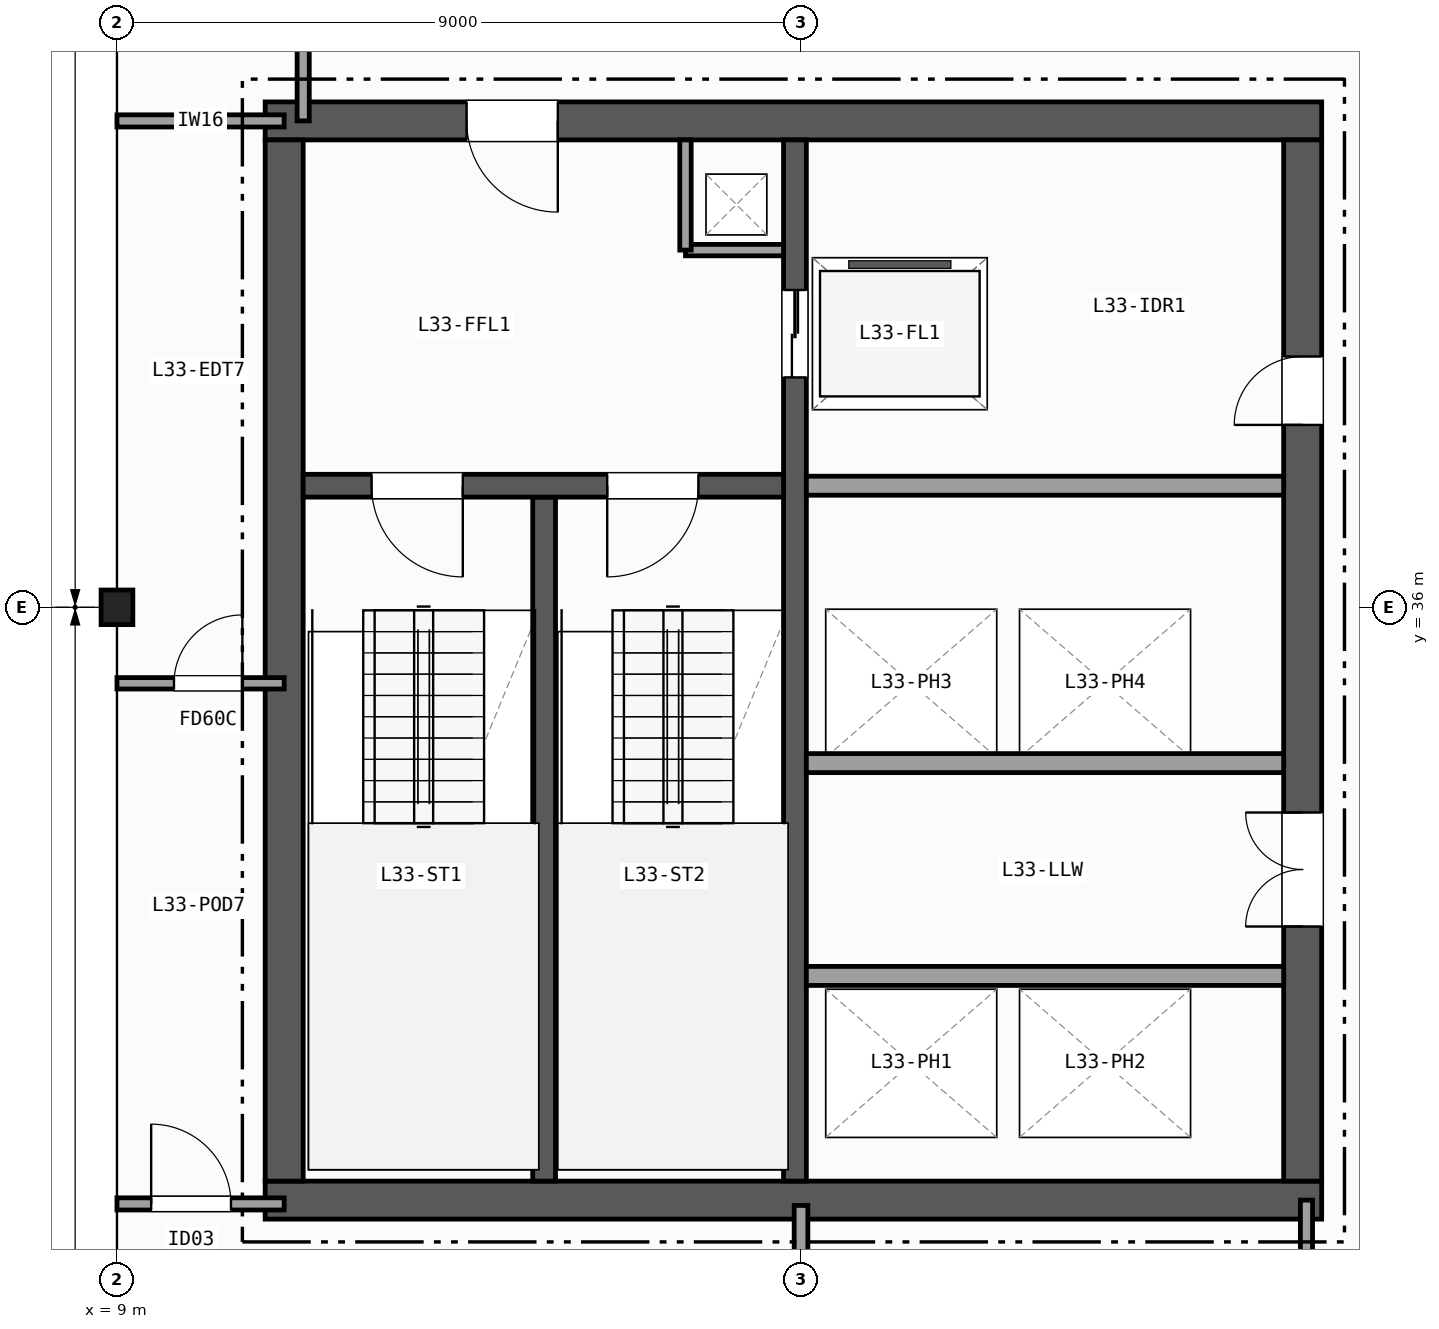
"""IFC4 building model, lengths in metres.
Left out: names, types, materials, properties, quantities, classifications, styles, units other than length and angle.
Written with IfcOpenShell. Run it as: python <this file> out.ifc"""

import sys

from ifc_helpers import new_model, si_unit, direction, frame, frame_2d, origin, origin_2d, place, context, subcontext, project, spatial, rectangle, i_section, extrude, element, fill, save


model = new_model("IFC4")
c1 = context("Model", 3, precision=1e-05, world=origin(), true_north=direction((0.0, 1.0)))
c2 = subcontext(c1, "Body", "Model", "MODEL_VIEW")
j1 = project(units=[si_unit("LENGTHUNIT", "METRE"), si_unit("PLANEANGLEUNIT", "RADIAN")], contexts=[c1])
p1 = place(None, origin())
s1 = spatial("IfcSite", under=j1, at=p1, CompositionType="ELEMENT")
p2 = place(p1, origin())
s2 = spatial("IfcBuilding", under=s1, at=p2, CompositionType="ELEMENT")
p3 = place(p2, frame((0.0, 0.0, 135.9)))
s3 = spatial("IfcBuildingStorey", under=s2, at=p3, CompositionType="ELEMENT", Elevation=135.9)
p4 = place(p3, frame((9.0, 36.0, 0.0), z_axis=(0.0, 0.0, 1.0), x_axis=(1.0, 0.0, 0.0)))
e1 = element("IfcColumn", 1, at=p4, inside=s3, PredefinedType="COLUMN", context=c2, shape_type="SweptSolid", body=[
    extrude(i_section(OverallWidth=0.418, OverallDepth=0.455, WebThickness=0.042, FlangeThickness=0.068, FilletRadius=0.015, at=origin_2d()), origin(), (0.0, 0.0, 1.0), 3.7),
])
p5 = place(p3, frame((10.95, 28.2, 0.0), z_axis=(0.0, 0.0, 1.0), x_axis=(1.0, 0.0, 0.0)))
e2 = element("IfcWall", 2, at=p5, inside=s3, PredefinedType="SHEAR", context=c2, shape_type="SweptSolid", body=[
    extrude(rectangle(XDim=13.9, YDim=0.5, at=frame_2d((6.95, 0.0))), origin(), (0.0, 0.0, 1.0), 3.42),
])
p6 = place(p3, frame((24.85, 42.4, 0.0), z_axis=(0.0, 0.0, 1.0), x_axis=(-1.0, 0.0, 0.0)))
e3 = element("IfcWall", 3, at=p6, inside=s3, PredefinedType="SHEAR", context=c2, shape_type="SweptSolid", body=[
    extrude(rectangle(XDim=13.9, YDim=0.5, at=frame_2d((6.95, 0.0))), origin(), (0.0, 0.0, 1.0), 3.42),
])
p7 = place(p6, frame((10.05, 0.0, 0.0)))
e4 = element("IfcOpeningElement", 4, at=p7, cuts=e3, PredefinedType="OPENING", context=c2, shape_type="SweptSolid", body=[
    extrude(rectangle(XDim=1.2, YDim=2.15, at=frame_2d((0.6, 1.075))), frame((0.0, 0.26, 0.0), z_axis=(0.0, -1.0, 0.0), x_axis=(1.0, 0.0, 0.0)), (0.0, 0.0, 1.0), 0.52),
])
p8 = place(p3, frame((11.2, 42.15, 0.0), z_axis=(0.0, 0.0, 1.0), x_axis=(0.0, -1.0, 0.0)))
e5 = element("IfcWall", 5, at=p8, inside=s3, PredefinedType="SHEAR", context=c2, shape_type="SweptSolid", body=[
    extrude(rectangle(XDim=13.7, YDim=0.5, at=frame_2d((6.85, 0.0))), origin(), (0.0, 0.0, 1.0), 3.42),
])
p9 = place(p3, frame((24.6, 28.45, 0.0), z_axis=(0.0, 0.0, 1.0), x_axis=(0.0, 1.0, 0.0)))
e6 = element("IfcWall", 6, at=p9, inside=s3, PredefinedType="SHEAR", context=c2, shape_type="SweptSolid", body=[
    extrude(rectangle(XDim=13.7, YDim=0.5, at=frame_2d((6.85, 0.0))), origin(), (0.0, 0.0, 1.0), 3.42),
])
p10 = place(p9, frame((3.35, 0.0, 0.0)))
e7 = element("IfcOpeningElement", 7, at=p10, cuts=e6, PredefinedType="OPENING", context=c2, shape_type="SweptSolid", body=[
    extrude(rectangle(XDim=1.5, YDim=2.2, at=frame_2d((0.75, 1.1))), frame((0.0, 0.26, 0.0), z_axis=(0.0, -1.0, 0.0), x_axis=(1.0, 0.0, 0.0)), (0.0, 0.0, 1.0), 0.52),
])
p11 = place(p9, frame((9.95, 0.0, 0.0)))
e8 = element("IfcOpeningElement", 8, at=p11, cuts=e6, PredefinedType="OPENING", context=c2, shape_type="SweptSolid", body=[
    extrude(rectangle(XDim=0.9, YDim=2.1, at=frame_2d((0.45, 1.05))), frame((0.0, 0.26, 0.0), z_axis=(0.0, -1.0, 0.0), x_axis=(1.0, 0.0, 0.0)), (0.0, 0.0, 1.0), 0.52),
])
p12 = place(p3, frame((14.62, 28.45, 0.0), z_axis=(0.0, 0.0, 1.0), x_axis=(0.0, 1.0, 0.0)))
e9 = element("IfcWall", 9, at=p12, inside=s3, PredefinedType="SHEAR", context=c2, shape_type="SweptSolid", body=[
    extrude(rectangle(XDim=9.0, YDim=0.3, at=frame_2d((4.5, 0.0))), origin(), (0.0, 0.0, 1.0), 3.42),
])
p13 = place(p3, frame((17.92, 42.15, 0.0), z_axis=(0.0, 0.0, 1.0), x_axis=(0.0, -1.0, 0.0)))
e10 = element("IfcWall", 10, at=p13, inside=s3, PredefinedType="SHEAR", context=c2, shape_type="SweptSolid", body=[
    extrude(rectangle(XDim=13.7, YDim=0.3, at=frame_2d((6.85, 0.0))), origin(), (0.0, 0.0, 1.0), 3.42),
])
p14 = place(p13, frame((1.975, 0.0, 0.0)))
e11 = element("IfcOpeningElement", 11, at=p14, cuts=e10, PredefinedType="OPENING", context=c2, shape_type="SweptSolid", body=[
    extrude(rectangle(XDim=1.15, YDim=2.15, at=frame_2d((0.575, 1.075))), frame((0.0, 0.16, 0.0), z_axis=(0.0, -1.0, 0.0), x_axis=(1.0, 0.0, 0.0)), (0.0, 0.0, 1.0), 0.32),
])
p15 = place(p3, frame((17.77, 37.6, 0.0), z_axis=(0.0, 0.0, 1.0), x_axis=(-1.0, 0.0, 0.0)))
e12 = element("IfcWall", 12, at=p15, inside=s3, PredefinedType="SHEAR", context=c2, shape_type="SweptSolid", body=[
    extrude(rectangle(XDim=6.32, YDim=0.3, at=frame_2d((3.16, 0.0))), origin(), (0.0, 0.0, 1.0), 3.42),
])
p16 = place(p15, frame((4.22, 0.0, 0.0)))
e13 = element("IfcOpeningElement", 13, at=p16, cuts=e12, PredefinedType="OPENING", context=c2, shape_type="SweptSolid", body=[
    extrude(rectangle(XDim=1.2, YDim=2.15, at=frame_2d((0.6, 1.075))), frame((0.0, 0.16, 0.0), z_axis=(0.0, -1.0, 0.0), x_axis=(1.0, 0.0, 0.0)), (0.0, 0.0, 1.0), 0.32),
])
p17 = place(p15, frame((1.12, 0.0, 0.0)))
e14 = element("IfcOpeningElement", 14, at=p17, cuts=e12, PredefinedType="OPENING", context=c2, shape_type="SweptSolid", body=[
    extrude(rectangle(XDim=1.2, YDim=2.15, at=frame_2d((0.6, 1.075))), frame((0.0, 0.16, 0.0), z_axis=(0.0, -1.0, 0.0), x_axis=(1.0, 0.0, 0.0)), (0.0, 0.0, 1.0), 0.32),
])
p18 = place(p3, frame((16.48, 40.7, 0.0), z_axis=(0.0, 0.0, 1.0), x_axis=(1.0, 0.0, 0.0)))
e15 = element("IfcWall", 15, at=p18, inside=s3, PredefinedType="PARTITIONING", context=c2, shape_type="SweptSolid", body=[
    extrude(rectangle(XDim=1.29, YDim=0.15, at=frame_2d((0.645, 0.0))), origin(), (0.0, 0.0, 1.0), 3.42),
])
p19 = place(p3, frame((16.48, 40.7, 0.0), z_axis=(0.0, 0.0, 1.0), x_axis=(0.0, 1.0, 0.0)))
e16 = element("IfcWall", 16, at=p19, inside=s3, PredefinedType="PARTITIONING", context=c2, shape_type="SweptSolid", body=[
    extrude(rectangle(XDim=1.45, YDim=0.15, at=frame_2d((0.725, 0.0))), origin(), (0.0, 0.0, 1.0), 3.42),
])
for number, where, z_axis, x_axis in (
    (17, (18.07, 37.6, 0.0), (0.0, 0.0, 1.0), (1.0, 0.0, 0.0)),
    (18, (18.07, 31.15, 0.0), (0.0, 0.0, 1.0), (1.0, 0.0, 0.0)),
    (19, (24.35, 33.95, 0.0), (0.0, 0.0, 1.0), (-1.0, 0.0, 0.0)),
):
    element("IfcWall", number, at=place(p3, frame(where, z_axis=z_axis, x_axis=x_axis)), inside=s3, PredefinedType="PARTITIONING", context=c2, shape_type="SweptSolid", body=[
        extrude(rectangle(XDim=6.28, YDim=0.25, at=frame_2d((3.14, 0.0))), origin(), (0.0, 0.0, 1.0), 3.42),
    ])
p20 = place(p3, frame((9.0, 28.15, 0.0), z_axis=(0.0, 0.0, 1.0), x_axis=(1.0, 0.0, 0.0)))
e20 = element("IfcWall", 20, at=p20, inside=s3, PredefinedType="PARTITIONING", context=c2, shape_type="SweptSolid", body=[
    extrude(rectangle(XDim=2.2, YDim=0.16, at=frame_2d((1.1, 0.0))), origin(), (0.0, 0.0, 1.0), 2.634),
])
p21 = place(p20, frame((0.45, 0.0, 0.0)))
e21 = element("IfcOpeningElement", 21, at=p21, cuts=e20, PredefinedType="OPENING", context=c2, shape_type="SweptSolid", body=[
    extrude(rectangle(XDim=1.05, YDim=2.15, at=frame_2d((0.525, 1.075))), frame((0.0, 0.09, 0.0), z_axis=(0.0, -1.0, 0.0), x_axis=(1.0, 0.0, 0.0)), (0.0, 0.0, 1.0), 0.18),
])
p22 = place(p3, frame((9.0, 42.4, 0.0), z_axis=(0.0, 0.0, 1.0), x_axis=(1.0, 0.0, 0.0)))
e22 = element("IfcWall", 22, at=p22, inside=s3, PredefinedType="PARTITIONING", context=c2, shape_type="SweptSolid", body=[
    extrude(rectangle(XDim=2.2, YDim=0.16, at=frame_2d((1.1, 0.0))), origin(), (0.0, 0.0, 1.0), 2.634),
])
p23 = place(p3, frame((11.45, 42.4, 0.0), z_axis=(0.0, 0.0, 1.0), x_axis=(0.0, 1.0, 0.0)))
e23 = element("IfcWall", 23, at=p23, inside=s3, PredefinedType="PARTITIONING", context=c2, shape_type="SweptSolid", body=[
    extrude(rectangle(XDim=2.1, YDim=0.16, at=frame_2d((1.05, 0.0))), origin(), (0.0, 0.0, 1.0), 3.42),
])
p24 = place(p3, frame((9.0, 35.0, 0.0), z_axis=(0.0, 0.0, 1.0), x_axis=(1.0, 0.0, 0.0)))
e24 = element("IfcWall", 24, at=p24, inside=s3, PredefinedType="PARTITIONING", context=c2, shape_type="SweptSolid", body=[
    extrude(rectangle(XDim=2.2, YDim=0.15, at=frame_2d((1.1, 0.0))), origin(), (0.0, 0.0, 1.0), 2.634),
])
p25 = place(p24, frame((0.75, 0.0, 0.0)))
e25 = element("IfcOpeningElement", 25, at=p25, cuts=e24, PredefinedType="OPENING", context=c2, shape_type="SweptSolid", body=[
    extrude(rectangle(XDim=0.9, YDim=2.1, at=frame_2d((0.45, 1.05))), frame((0.0, 0.085, 0.0), z_axis=(0.0, -1.0, 0.0), x_axis=(1.0, 0.0, 0.0)), (0.0, 0.0, 1.0), 0.17),
])
p26 = place(p3, frame((24.65, 9.0, 0.0), z_axis=(0.0, 0.0, 1.0), x_axis=(0.0, 1.0, 0.0)))
e26 = element("IfcWall", 26, at=p26, inside=s3, PredefinedType="PARTITIONING", context=c2, shape_type="SweptSolid", body=[
    extrude(rectangle(XDim=19.2, YDim=0.16, at=frame_2d((9.6, 0.0))), origin(), (0.0, 0.0, 1.0), 2.634),
])
p27 = place(p26, frame((2.0, 0.0, 0.0)))
e27 = element("IfcOpeningElement", 27, at=p27, cuts=e26, PredefinedType="OPENING", context=c2, shape_type="SweptSolid", body=[
    extrude(rectangle(XDim=0.86, YDim=2.05, at=frame_2d((0.43, 1.025))), frame((0.0, 0.09, 0.0), z_axis=(0.0, -1.0, 0.0), x_axis=(1.0, 0.0, 0.0)), (0.0, 0.0, 1.0), 0.18),
])
p28 = place(p26, frame((8.15, 0.0, 0.0)))
e28 = element("IfcOpeningElement", 28, at=p28, cuts=e26, PredefinedType="OPENING", context=c2, shape_type="SweptSolid", body=[
    extrude(rectangle(XDim=0.95, YDim=2.1, at=frame_2d((0.475, 1.05))), frame((0.0, 0.09, 0.0), z_axis=(0.0, -1.0, 0.0), x_axis=(1.0, 0.0, 0.0)), (0.0, 0.0, 1.0), 0.18),
])
p29 = place(p26, frame((15.215, 0.0, 0.0)))
e29 = element("IfcOpeningElement", 29, at=p29, cuts=e26, PredefinedType="OPENING", context=c2, shape_type="SweptSolid", body=[
    extrude(rectangle(XDim=1.0, YDim=2.1, at=frame_2d((0.5, 1.05))), frame((0.0, 0.09, 0.0), z_axis=(0.0, -1.0, 0.0), x_axis=(1.0, 0.0, 0.0)), (0.0, 0.0, 1.0), 0.18),
])
p30 = place(p3, frame((18.0, 9.0, 0.0), z_axis=(0.0, 0.0, 1.0), x_axis=(0.0, 1.0, 0.0)))
e30 = element("IfcWall", 30, at=p30, inside=s3, PredefinedType="PARTITIONING", context=c2, shape_type="SweptSolid", body=[
    extrude(rectangle(XDim=19.13, YDim=0.18, at=frame_2d((9.565, 0.0))), origin(), (0.0, 0.0, 1.0), 2.634),
])
p31 = place(p30, frame((2.2, 0.0, 0.0)))
e31 = element("IfcOpeningElement", 31, at=p31, cuts=e30, PredefinedType="OPENING", context=c2, shape_type="SweptSolid", body=[
    extrude(rectangle(XDim=1.05, YDim=2.15, at=frame_2d((0.525, 1.075))), frame((0.0, 0.1, 0.0), z_axis=(0.0, -1.0, 0.0), x_axis=(1.0, 0.0, 0.0)), (0.0, 0.0, 1.0), 0.2),
])
p32 = place(p30, frame((13.5, 0.0, 0.0)))
e32 = element("IfcOpeningElement", 32, at=p32, cuts=e30, PredefinedType="OPENING", context=c2, shape_type="SweptSolid", body=[
    extrude(rectangle(XDim=1.2, YDim=2.15, at=frame_2d((0.6, 1.075))), frame((0.0, 0.1, 0.0), z_axis=(0.0, -1.0, 0.0), x_axis=(1.0, 0.0, 0.0)), (0.0, 0.0, 1.0), 0.2),
])
p33 = place(p16, origin())
e33 = element("IfcDoor", 33, at=p33, inside=s3, OperationType="SINGLE_SWING_LEFT", PredefinedType="DOOR", context=c2, shape_type="SweptSolid", body=[
    extrude(rectangle(XDim=1.2, YDim=2.15, at=frame_2d((0.6, 1.075))), frame((0.0, 0.025, 0.0), z_axis=(0.0, -1.0, 0.0), x_axis=(1.0, 0.0, 0.0)), (0.0, 0.0, 1.0), 0.05),
])
fill(e13, e33)
p34 = place(p17, origin())
e34 = element("IfcDoor", 34, at=p34, inside=s3, OperationType="SINGLE_SWING_RIGHT", PredefinedType="DOOR", context=c2, shape_type="SweptSolid", body=[
    extrude(rectangle(XDim=1.2, YDim=2.15, at=frame_2d((0.6, 1.075))), frame((0.0, 0.025, 0.0), z_axis=(0.0, -1.0, 0.0), x_axis=(1.0, 0.0, 0.0)), (0.0, 0.0, 1.0), 0.05),
])
fill(e14, e34)
p35 = place(p10, origin())
e35 = element("IfcDoor", 35, at=p35, inside=s3, OperationType="DOUBLE_DOOR_SINGLE_SWING", PredefinedType="DOOR", context=c2, shape_type="SweptSolid", body=[
    extrude(rectangle(XDim=1.5, YDim=2.2, at=frame_2d((0.75, 1.1))), frame((0.0, 0.025, 0.0), z_axis=(0.0, -1.0, 0.0), x_axis=(1.0, 0.0, 0.0)), (0.0, 0.0, 1.0), 0.05),
])
fill(e7, e35)
p36 = place(p7, origin())
e36 = element("IfcDoor", 36, at=p36, inside=s3, OperationType="SINGLE_SWING_LEFT", PredefinedType="DOOR", context=c2, shape_type="SweptSolid", body=[
    extrude(rectangle(XDim=1.2, YDim=2.15, at=frame_2d((0.6, 1.075))), frame((0.0, 0.025, 0.0), z_axis=(0.0, -1.0, 0.0), x_axis=(1.0, 0.0, 0.0)), (0.0, 0.0, 1.0), 0.05),
])
fill(e4, e36)
p37 = place(p11, origin())
e37 = element("IfcDoor", 37, at=p37, inside=s3, OperationType="SINGLE_SWING_LEFT", PredefinedType="DOOR", context=c2, shape_type="SweptSolid", body=[
    extrude(rectangle(XDim=0.9, YDim=2.1, at=frame_2d((0.45, 1.05))), frame((0.0, 0.025, 0.0), z_axis=(0.0, -1.0, 0.0), x_axis=(1.0, 0.0, 0.0)), (0.0, 0.0, 1.0), 0.05),
])
fill(e8, e37)
p38 = place(p14, origin())
e38 = element("IfcDoor", 38, at=p38, inside=s3, OperationType="DOUBLE_DOOR_SLIDING", PredefinedType="DOOR", context=c2, shape_type="SweptSolid", body=[
    extrude(rectangle(XDim=1.15, YDim=2.15, at=frame_2d((0.575, 1.075))), frame((0.0, 0.025, 0.0), z_axis=(0.0, -1.0, 0.0), x_axis=(1.0, 0.0, 0.0)), (0.0, 0.0, 1.0), 0.05),
])
fill(e11, e38)
p39 = place(p21, origin())
e39 = element("IfcDoor", 39, at=p39, inside=s3, OperationType="SINGLE_SWING_LEFT", PredefinedType="DOOR", context=c2, shape_type="SweptSolid", body=[
    extrude(rectangle(XDim=1.05, YDim=2.15, at=frame_2d((0.525, 1.075))), frame((0.0, 0.025, 0.0), z_axis=(0.0, -1.0, 0.0), x_axis=(1.0, 0.0, 0.0)), (0.0, 0.0, 1.0), 0.05),
])
fill(e21, e39)
p40 = place(p25, origin())
e40 = element("IfcDoor", 40, at=p40, inside=s3, OperationType="SINGLE_SWING_RIGHT", PredefinedType="DOOR", context=c2, shape_type="SweptSolid", body=[
    extrude(rectangle(XDim=0.9, YDim=2.1, at=frame_2d((0.45, 1.05))), frame((0.0, 0.025, 0.0), z_axis=(0.0, -1.0, 0.0), x_axis=(1.0, 0.0, 0.0)), (0.0, 0.0, 1.0), 0.05),
])
fill(e25, e40)
save(model, sys.argv[1])
